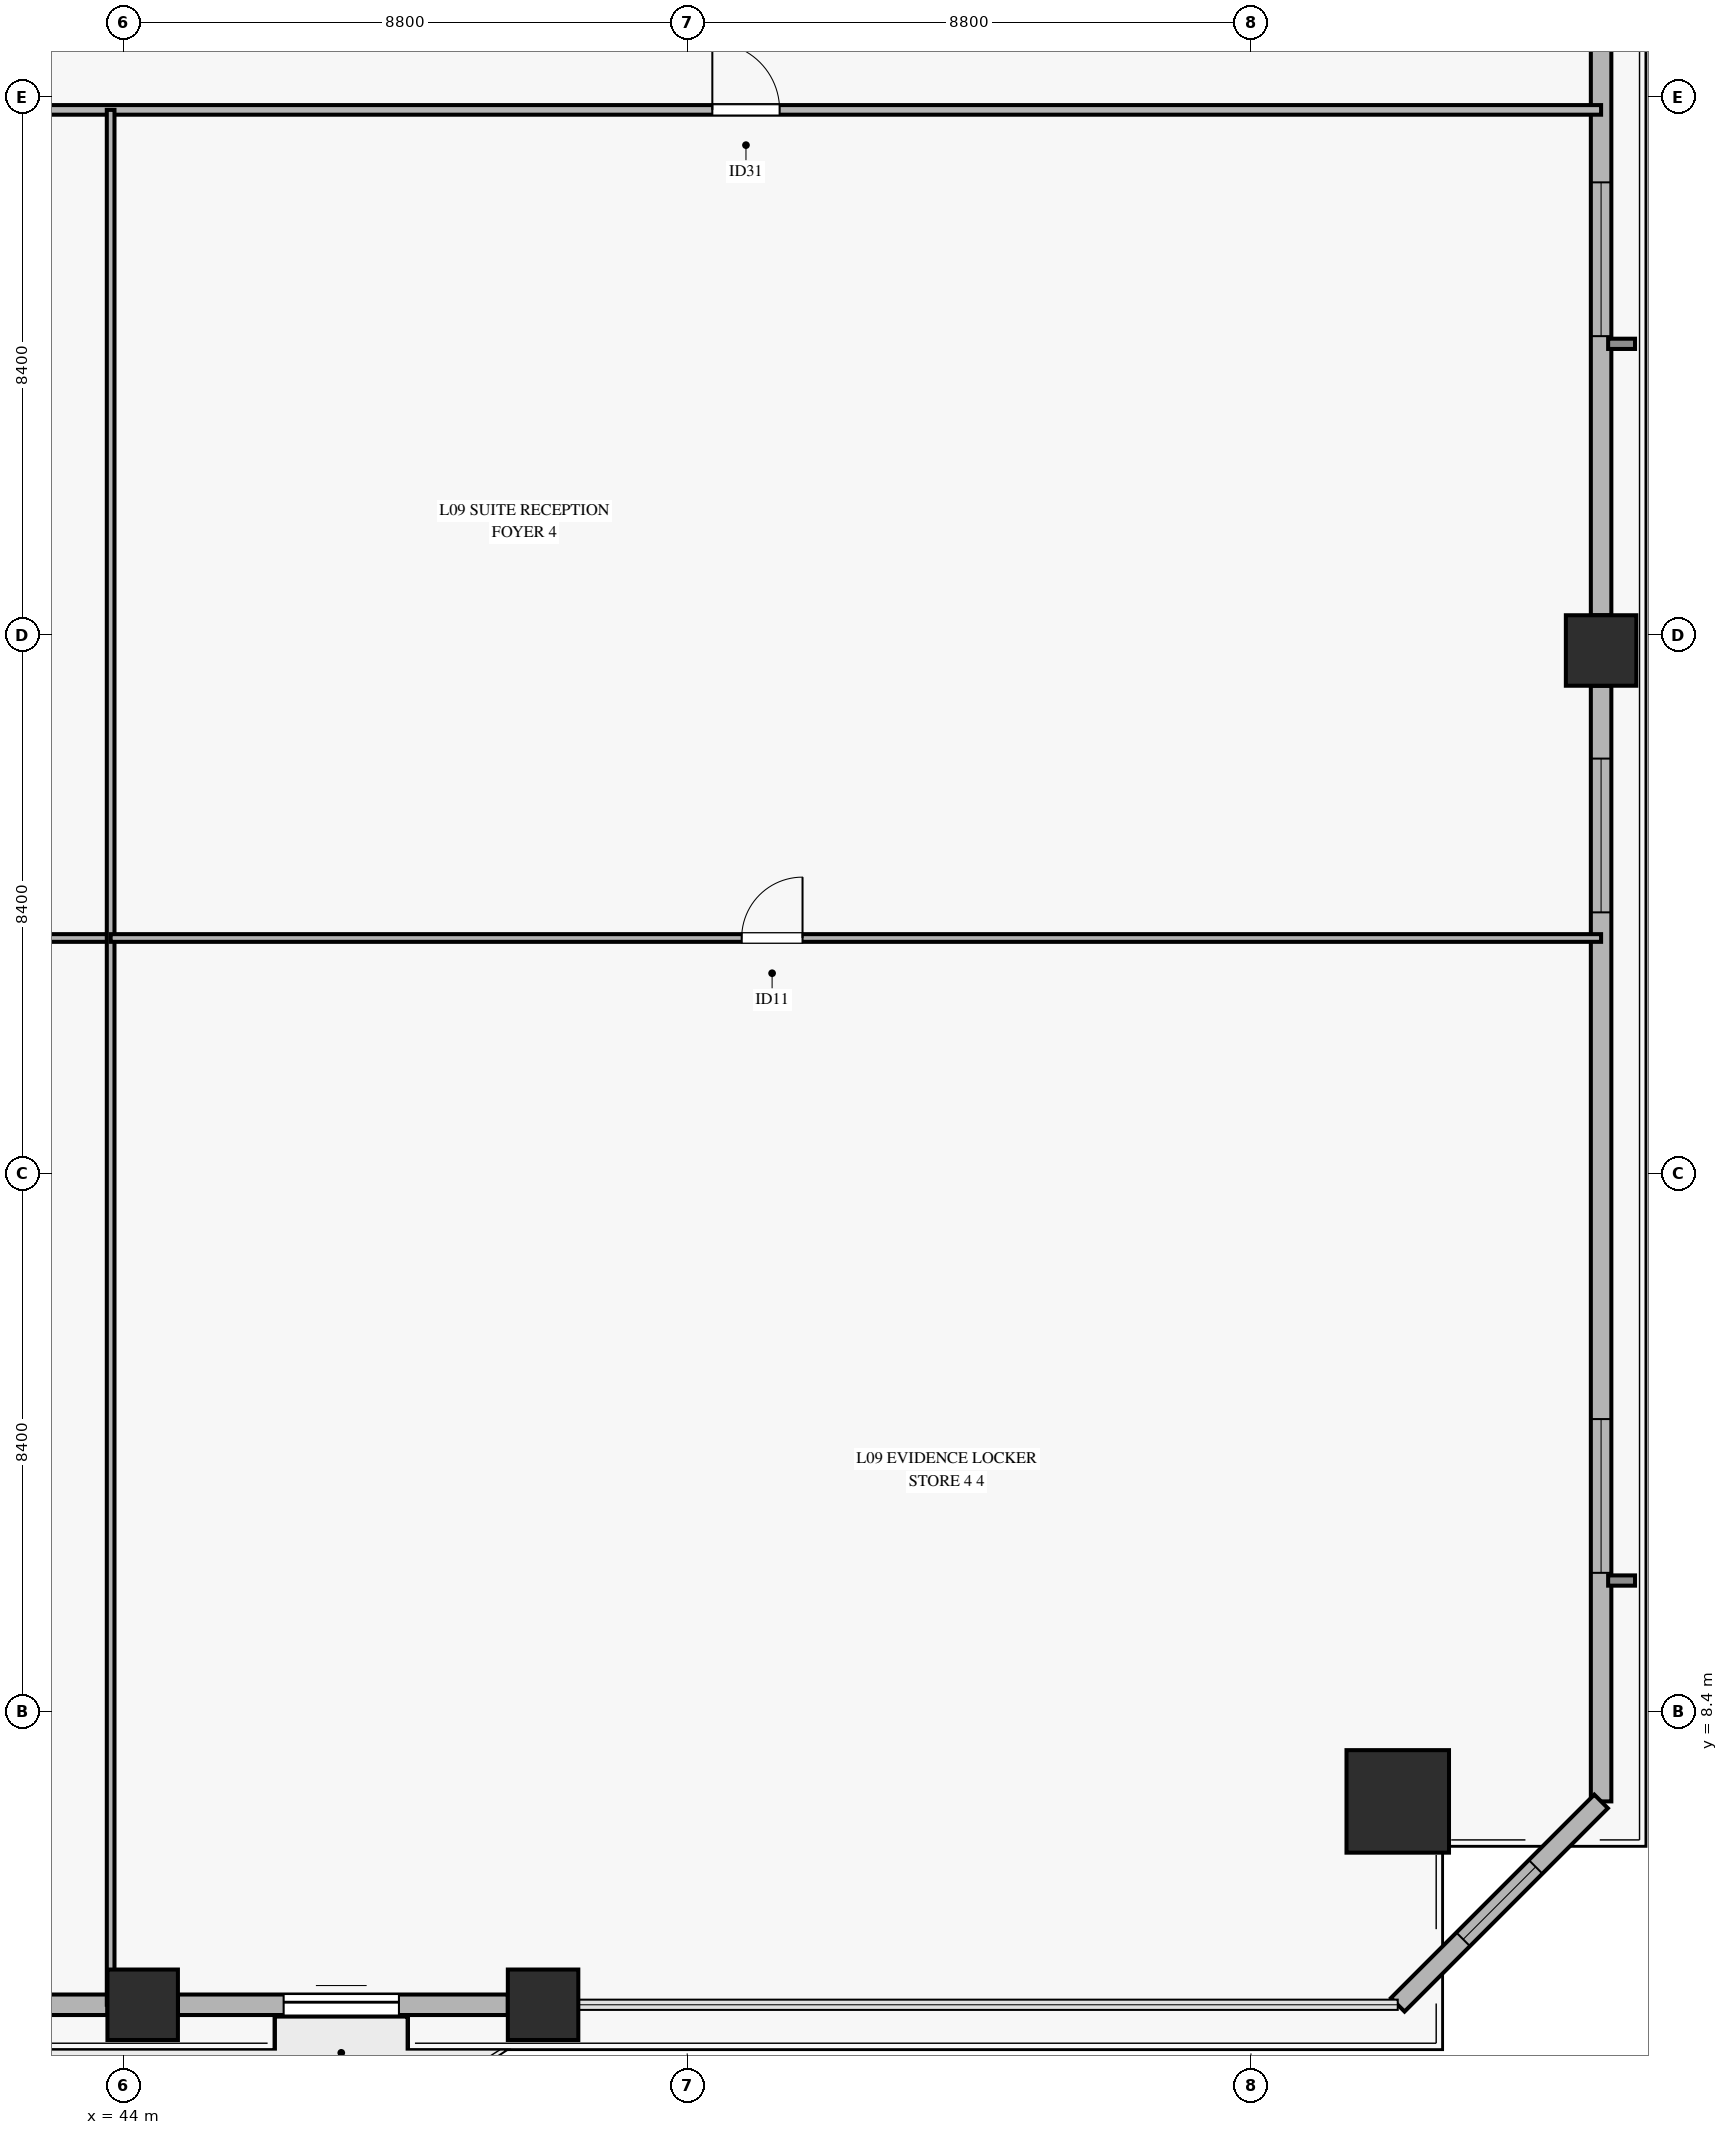
"""IFC4 building model, lengths in metres.
Left out: names, types, materials, properties, quantities, classifications, styles, units other than length and angle.
Written with IfcOpenShell. Run it as: python <this file> out.ifc"""

import sys

from ifc_helpers import new_model, si_unit, direction, frame, frame_2d, origin, origin_2d, place, context, subcontext, project, spatial, rectangle, hollow_rectangle, extrude, source, transform, mapped, element, fill, save


model = new_model("IFC4")
c1 = context("Model", 3, precision=1e-05, world=origin(), true_north=direction((0.0, 1.0)))
c2 = subcontext(c1, "Body", "Model", "MODEL_VIEW")
j1 = project(units=[si_unit("LENGTHUNIT", "METRE"), si_unit("PLANEANGLEUNIT", "RADIAN")], contexts=[c1])
p1 = place(None, origin())
s1 = spatial("IfcSite", under=j1, at=p1, CompositionType="ELEMENT")
p2 = place(p1, origin())
s2 = spatial("IfcBuilding", under=s1, at=p2, CompositionType="ELEMENT")
p3 = place(p2, frame((0.0, 0.0, 37.1)))
s3 = spatial("IfcBuildingStorey", under=s2, at=p3, CompositionType="ELEMENT", Elevation=37.1)
m1 = source(origin(), c2, "Body", "SweptSolid", [
    extrude(hollow_rectangle(XDim=1.6, YDim=1.6, WallThickness=0.075, at=origin_2d()), origin(), (0.0, 0.0, 1.0), 3.68),
])
p4 = place(p3, frame((63.891, 7.001, 0.0), z_axis=(0.0, 0.0, 1.0), x_axis=(1.0, 0.0, 0.0)))
e1 = element("IfcColumn", 1, at=p4, inside=s3, PredefinedType="COLUMN", context=c2, shape_type="MappedRepresentation", body=[
    mapped(m1, transform((0.0, 0.0, 0.0), x_axis=(1.0, 0.0, 0.0), y_axis=(0.0, 1.0, 0.0), z_axis=(0.0, 0.0, 1.0), scale=1.0)),
])
m2 = source(origin(), c2, "Body", "SweptSolid", [
    extrude(hollow_rectangle(XDim=1.1, YDim=1.1, WallThickness=0.05, at=origin_2d()), origin(), (0.0, 0.0, 1.0), 3.68),
])
for number, where, z_axis, x_axis in (
    (2, (44.3, 3.827, 0.0), (0.0, 0.0, 1.0), (1.0, 0.0, 0.0)),
    (3, (50.55, 3.827, 0.0), (0.0, 0.0, 1.0), (1.0, 0.0, 0.0)),
    (4, (67.065, 24.963, 0.0), (0.0, 0.0, 1.0), (1.0, 0.0, 0.0)),
):
    element("IfcColumn", number, at=place(p3, frame(where, z_axis=z_axis, x_axis=x_axis)), inside=s3, PredefinedType="COLUMN", context=c2, shape_type="MappedRepresentation", body=[
        mapped(m2, transform((0.0, 0.0, 0.0), x_axis=(1.0, 0.0, 0.0), y_axis=(0.0, 1.0, 0.0), z_axis=(0.0, 0.0, 1.0), scale=1.0)),
    ])
p5 = place(p3, frame((38.1, 3.827, 0.0), z_axis=(0.0, 0.0, 1.0), x_axis=(1.0, 0.0, 0.0)))
e5 = element("IfcWall", 5, at=p5, inside=s3, PredefinedType="SOLIDWALL", context=c2, shape_type="SweptSolid", body=[
    extrude(rectangle(XDim=5.65, YDim=0.32, at=frame_2d((2.825, 0.0))), origin(), (0.0, 0.0, 1.0), 3.16),
])
p6 = place(p3, frame((44.85, 3.827, 0.0), z_axis=(0.0, 0.0, 1.0), x_axis=(1.0, 0.0, 0.0)))
e6 = element("IfcWall", 6, at=p6, inside=s3, PredefinedType="SOLIDWALL", context=c2, shape_type="SweptSolid", body=[
    extrude(rectangle(XDim=5.15, YDim=0.32, at=frame_2d((2.575, 0.0))), origin(), (0.0, 0.0, 1.0), 3.16),
])
p7 = place(p6, frame((1.65, 0.0, 0.0)))
e7 = element("IfcOpeningElement", 7, at=p7, cuts=e6, PredefinedType="OPENING", context=c2, shape_type="SweptSolid", body=[
    extrude(rectangle(XDim=1.8, YDim=2.25, at=frame_2d((0.9, 1.125))), frame((0.0, 0.17, 0.0), z_axis=(0.0, -1.0, 0.0), x_axis=(1.0, 0.0, 0.0)), (0.0, 0.0, 1.0), 0.34),
])
p8 = place(p3, frame((67.065, 7.001, 0.0), z_axis=(0.0, 0.0, 1.0), x_axis=(0.0, 1.0, 0.0)))
e8 = element("IfcWall", 8, at=p8, inside=s3, PredefinedType="SOLIDWALL", context=c2, shape_type="SweptSolid", body=[
    extrude(rectangle(XDim=17.412, YDim=0.32, at=frame_2d((8.706, 0.0))), origin(), (0.0, 0.0, 1.0), 3.16),
])
p9 = place(p8, frame((3.567, 0.0, 0.45)))
e9 = element("IfcOpeningElement", 9, at=p9, cuts=e8, PredefinedType="OPENING", context=c2, shape_type="SweptSolid", body=[
    extrude(rectangle(XDim=2.4, YDim=2.1, at=frame_2d((1.2, 1.05))), frame((0.0, 0.17, 0.0), z_axis=(0.0, -1.0, 0.0), x_axis=(1.0, 0.0, 0.0)), (0.0, 0.0, 1.0), 0.34),
])
p10 = place(p8, frame((13.875, 0.0, 0.45)))
e10 = element("IfcOpeningElement", 10, at=p10, cuts=e8, PredefinedType="OPENING", context=c2, shape_type="SweptSolid", body=[
    extrude(rectangle(XDim=2.4, YDim=2.1, at=frame_2d((1.2, 1.05))), frame((0.0, 0.17, 0.0), z_axis=(0.0, -1.0, 0.0), x_axis=(1.0, 0.0, 0.0)), (0.0, 0.0, 1.0), 0.34),
])
p11 = place(p3, frame((67.065, 25.513, 0.0), z_axis=(0.0, 0.0, 1.0), x_axis=(0.0, 1.0, 0.0)))
e11 = element("IfcWall", 11, at=p11, inside=s3, PredefinedType="SOLIDWALL", context=c2, shape_type="SweptSolid", body=[
    extrude(rectangle(XDim=17.413, YDim=0.32, at=frame_2d((8.707, 0.0))), origin(), (0.0, 0.0, 1.0), 3.16),
])
p12 = place(p11, frame((4.356, 0.0, 0.45)))
e12 = element("IfcOpeningElement", 12, at=p12, cuts=e11, PredefinedType="OPENING", context=c2, shape_type="SweptSolid", body=[
    extrude(rectangle(XDim=2.4, YDim=2.1, at=frame_2d((1.2, 1.05))), frame((0.0, 0.17, 0.0), z_axis=(0.0, -1.0, 0.0), x_axis=(1.0, 0.0, 0.0)), (0.0, 0.0, 1.0), 0.34),
])
p13 = place(p3, frame((63.891, 3.827, 0.0), z_axis=(0.0, 0.0, 1.0), x_axis=(0.707079585295, 0.707133976032, 0.0)))
e13 = element("IfcWall", 13, at=p13, inside=s3, PredefinedType="SOLIDWALL", context=c2, shape_type="SweptSolid", body=[
    extrude(rectangle(XDim=4.489, YDim=0.3, at=frame_2d((2.244, 0.0))), origin(), (0.0, 0.0, 1.0), 3.16),
])
p14 = place(p13, frame((1.444, 0.0, 0.45)))
e14 = element("IfcOpeningElement", 14, at=p14, cuts=e13, PredefinedType="OPENING", context=c2, shape_type="SweptSolid", body=[
    extrude(rectangle(XDim=1.6, YDim=2.0, at=frame_2d((0.8, 1.0))), frame((0.0, 0.16, 0.0), z_axis=(0.0, -1.0, 0.0), x_axis=(1.0, 0.0, 0.0)), (0.0, 0.0, 1.0), 0.32),
])
p15 = place(p3, frame((3.335, 33.4, 0.0), z_axis=(0.0, 0.0, 1.0), x_axis=(1.0, 0.0, 0.0)))
e15 = element("IfcWall", 15, at=p15, inside=s3, PredefinedType="PARTITIONING", context=c2, shape_type="SweptSolid", body=[
    extrude(rectangle(XDim=63.73, YDim=0.15, at=frame_2d((31.865, 0.0))), origin(), (0.0, 0.0, 1.0), 2.765),
])
p16 = place(p15, frame((10.072, 0.0, 0.0)))
e16 = element("IfcOpeningElement", 16, at=p16, cuts=e15, PredefinedType="OPENING", context=c2, shape_type="SweptSolid", body=[
    extrude(rectangle(XDim=1.05, YDim=2.15, at=frame_2d((0.525, 1.075))), frame((0.0, 0.085, 0.0), z_axis=(0.0, -1.0, 0.0), x_axis=(1.0, 0.0, 0.0)), (0.0, 0.0, 1.0), 0.17),
])
p17 = place(p15, frame((27.831, 0.0, 0.0)))
e17 = element("IfcOpeningElement", 17, at=p17, cuts=e15, PredefinedType="OPENING", context=c2, shape_type="SweptSolid", body=[
    extrude(rectangle(XDim=1.05, YDim=2.15, at=frame_2d((0.525, 1.075))), frame((0.0, 0.085, 0.0), z_axis=(0.0, -1.0, 0.0), x_axis=(1.0, 0.0, 0.0)), (0.0, 0.0, 1.0), 0.17),
])
p18 = place(p15, frame((35.831, 0.0, 0.0)))
e18 = element("IfcOpeningElement", 18, at=p18, cuts=e15, PredefinedType="OPENING", context=c2, shape_type="SweptSolid", body=[
    extrude(rectangle(XDim=1.05, YDim=2.15, at=frame_2d((0.525, 1.075))), frame((0.0, 0.085, 0.0), z_axis=(0.0, -1.0, 0.0), x_axis=(1.0, 0.0, 0.0)), (0.0, 0.0, 1.0), 0.17),
])
p19 = place(p15, frame((49.857, 0.0, 0.0)))
e19 = element("IfcOpeningElement", 19, at=p19, cuts=e15, PredefinedType="OPENING", context=c2, shape_type="SweptSolid", body=[
    extrude(rectangle(XDim=1.05, YDim=2.15, at=frame_2d((0.525, 1.075))), frame((0.0, 0.085, 0.0), z_axis=(0.0, -1.0, 0.0), x_axis=(1.0, 0.0, 0.0)), (0.0, 0.0, 1.0), 0.17),
])
p20 = place(p3, frame((35.8, 20.476, 0.0), z_axis=(0.0, 0.0, 1.0), x_axis=(1.0, 0.0, 0.0)))
e20 = element("IfcWall", 20, at=p20, inside=s3, PredefinedType="PARTITIONING", context=c2, shape_type="SweptSolid", body=[
    extrude(rectangle(XDim=8.0, YDim=0.12, at=frame_2d((4.0, 0.0))), origin(), (0.0, 0.0, 1.0), 2.765),
])
p21 = place(p20, frame((3.523, 0.0, 0.0)))
e21 = element("IfcOpeningElement", 21, at=p21, cuts=e20, PredefinedType="OPENING", context=c2, shape_type="SweptSolid", body=[
    extrude(rectangle(XDim=0.95, YDim=2.1, at=frame_2d((0.475, 1.05))), frame((0.0, 0.07, 0.0), z_axis=(0.0, -1.0, 0.0), x_axis=(1.0, 0.0, 0.0)), (0.0, 0.0, 1.0), 0.14),
])
p22 = place(p3, frame((43.8, 3.827, 0.0), z_axis=(0.0, 0.0, 1.0), x_axis=(0.0, 1.0, 0.0)))
e22 = element("IfcWall", 22, at=p22, inside=s3, PredefinedType="PARTITIONING", context=c2, shape_type="SweptSolid", body=[
    extrude(rectangle(XDim=29.573, YDim=0.12, at=frame_2d((14.787, 0.0))), origin(), (0.0, 0.0, 1.0), 3.215),
])
p23 = place(p3, frame((43.8, 20.476, 0.0), z_axis=(0.0, 0.0, 1.0), x_axis=(1.0, 0.0, 0.0)))
e23 = element("IfcWall", 23, at=p23, inside=s3, PredefinedType="PARTITIONING", context=c2, shape_type="SweptSolid", body=[
    extrude(rectangle(XDim=23.265, YDim=0.12, at=frame_2d((11.632, 0.0))), origin(), (0.0, 0.0, 1.0), 2.765),
])
p24 = place(p23, frame((9.85, 0.0, 0.0)))
e24 = element("IfcOpeningElement", 24, at=p24, cuts=e23, PredefinedType="OPENING", context=c2, shape_type="SweptSolid", body=[
    extrude(rectangle(XDim=0.95, YDim=2.1, at=frame_2d((0.475, 1.05))), frame((0.0, 0.07, 0.0), z_axis=(0.0, -1.0, 0.0), x_axis=(1.0, 0.0, 0.0)), (0.0, 0.0, 1.0), 0.14),
])
m3 = source(origin(), c2, "Body", "SweptSolid", [
    extrude(rectangle(XDim=1.8, YDim=2.25, at=frame_2d((0.9, 1.125))), frame((0.0, 0.025, 0.0), z_axis=(0.0, -1.0, 0.0), x_axis=(1.0, 0.0, 0.0)), (0.0, 0.0, 1.0), 0.05),
])
p25 = place(p7, origin())
e25 = element("IfcDoor", 25, at=p25, inside=s3, OperationType="SLIDING_TO_LEFT", PredefinedType="DOOR", context=c2, shape_type="MappedRepresentation", body=[
    mapped(m3, transform((0.0, 0.0, 0.0), x_axis=(1.0, 0.0, 0.0), y_axis=(0.0, 1.0, 0.0), z_axis=(0.0, 0.0, 1.0), scale=1.0)),
])
fill(e7, e25)
m4 = source(origin(), c2, "Body", "SweptSolid", [
    extrude(rectangle(XDim=2.4, YDim=2.1, at=frame_2d((1.2, 1.05))), frame((0.0, 0.03, 0.0), z_axis=(0.0, -1.0, 0.0), x_axis=(1.0, 0.0, 0.0)), (0.0, 0.0, 1.0), 0.06),
])
p26 = place(p9, origin())
e26 = element("IfcWindow", 26, at=p26, inside=s3, PartitioningType="SINGLE_PANEL", PredefinedType="WINDOW", context=c2, shape_type="MappedRepresentation", body=[
    mapped(m4, transform((0.0, 0.0, 0.0), x_axis=(1.0, 0.0, 0.0), y_axis=(0.0, 1.0, 0.0), z_axis=(0.0, 0.0, 1.0), scale=1.0)),
])
fill(e9, e26)
p27 = place(p10, origin())
e27 = element("IfcWindow", 27, at=p27, inside=s3, PartitioningType="SINGLE_PANEL", PredefinedType="WINDOW", context=c2, shape_type="MappedRepresentation", body=[
    mapped(m4, transform((0.0, 0.0, 0.0), x_axis=(1.0, 0.0, 0.0), y_axis=(0.0, 1.0, 0.0), z_axis=(0.0, 0.0, 1.0), scale=1.0)),
])
fill(e10, e27)
p28 = place(p12, origin())
e28 = element("IfcWindow", 28, at=p28, inside=s3, PartitioningType="SINGLE_PANEL", PredefinedType="WINDOW", context=c2, shape_type="MappedRepresentation", body=[
    mapped(m4, transform((0.0, 0.0, 0.0), x_axis=(1.0, 0.0, 0.0), y_axis=(0.0, 1.0, 0.0), z_axis=(0.0, 0.0, 1.0), scale=1.0)),
])
fill(e12, e28)
m5 = source(origin(), c2, "Body", "SweptSolid", [
    extrude(rectangle(XDim=1.6, YDim=2.0, at=frame_2d((0.8, 1.0))), frame((0.0, 0.03, 0.0), z_axis=(0.0, -1.0, 0.0), x_axis=(1.0, 0.0, 0.0)), (0.0, 0.0, 1.0), 0.06),
])
p29 = place(p14, origin())
e29 = element("IfcWindow", 29, at=p29, inside=s3, PartitioningType="SINGLE_PANEL", PredefinedType="WINDOW", context=c2, shape_type="MappedRepresentation", body=[
    mapped(m5, transform((0.0, 0.0, 0.0), x_axis=(1.0, 0.0, 0.0), y_axis=(0.0, 1.0, 0.0), z_axis=(0.0, 0.0, 1.0), scale=1.0)),
])
fill(e14, e29)
m6 = source(origin(), c2, "Body", "SweptSolid", [
    extrude(rectangle(XDim=1.05, YDim=2.15, at=frame_2d((0.525, 1.075))), frame((0.0, 0.025, 0.0), z_axis=(0.0, -1.0, 0.0), x_axis=(1.0, 0.0, 0.0)), (0.0, 0.0, 1.0), 0.05),
])
p30 = place(p19, origin())
e30 = element("IfcDoor", 30, at=p30, inside=s3, OperationType="SINGLE_SWING_LEFT", PredefinedType="DOOR", context=c2, shape_type="MappedRepresentation", body=[
    mapped(m6, transform((0.0, 0.0, 0.0), x_axis=(1.0, 0.0, 0.0), y_axis=(0.0, 1.0, 0.0), z_axis=(0.0, 0.0, 1.0), scale=1.0)),
])
fill(e19, e30)
m7 = source(origin(), c2, "Body", "SweptSolid", [
    extrude(rectangle(XDim=0.95, YDim=2.1, at=frame_2d((0.475, 1.05))), frame((0.0, 0.025, 0.0), z_axis=(0.0, -1.0, 0.0), x_axis=(1.0, 0.0, 0.0)), (0.0, 0.0, 1.0), 0.05),
])
p31 = place(p24, origin())
e31 = element("IfcDoor", 31, at=p31, inside=s3, OperationType="SINGLE_SWING_RIGHT", PredefinedType="DOOR", context=c2, shape_type="MappedRepresentation", body=[
    mapped(m7, transform((0.0, 0.0, 0.0), x_axis=(1.0, 0.0, 0.0), y_axis=(0.0, 1.0, 0.0), z_axis=(0.0, 0.0, 1.0), scale=1.0)),
])
fill(e24, e31)
save(model, sys.argv[1])
